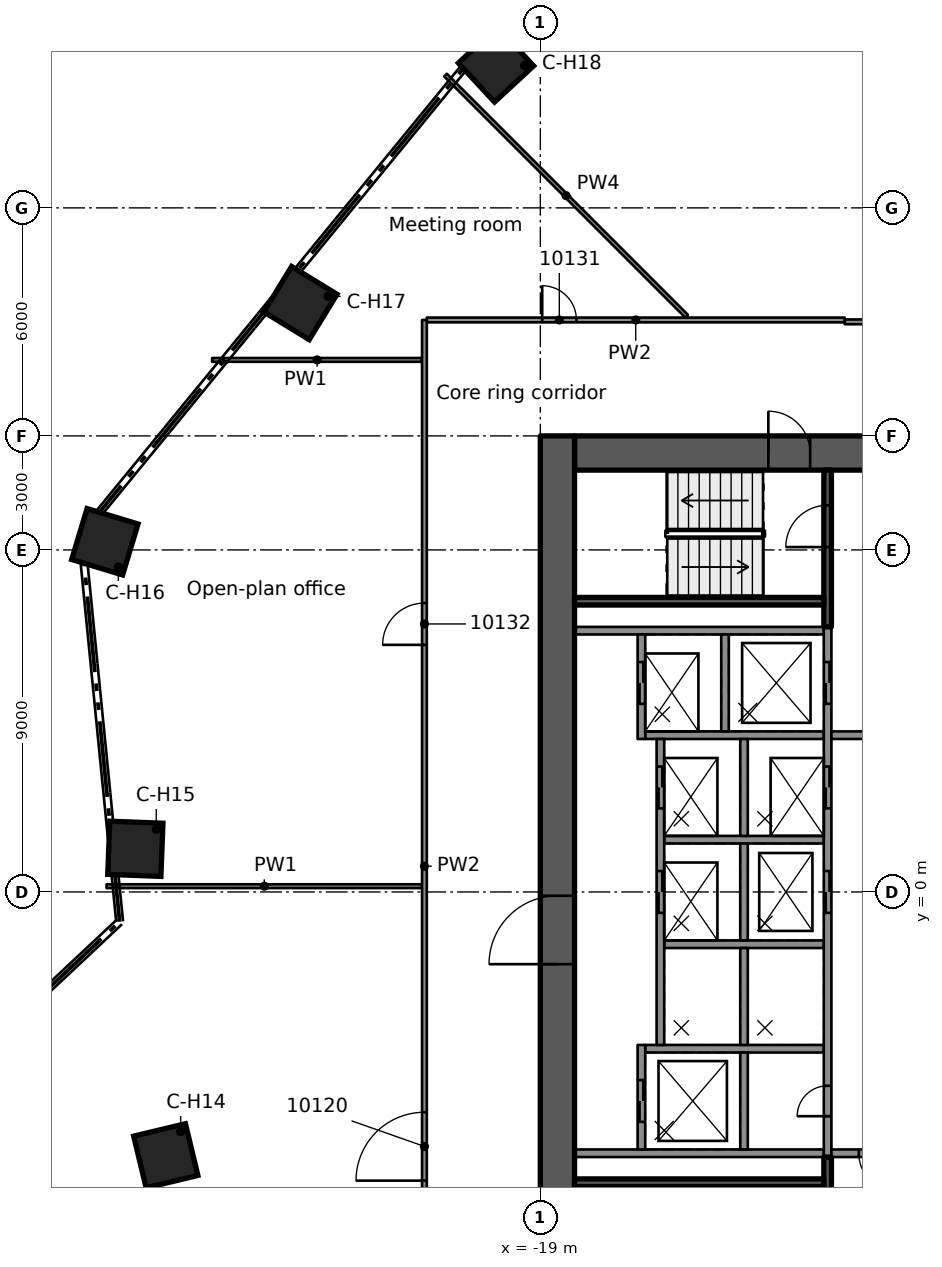
"""IFC4 building model, lengths in metres.
Left out: names, types, materials, properties, quantities, classifications, styles, units other than length and angle.
Written with IfcOpenShell. Run it as: python <this file> out.ifc"""

import sys

from ifc_helpers import new_model, si_unit, direction, frame, frame_2d, origin, origin_2d, place, context, subcontext, project, spatial, rectangle, extrude, element, fill, save


model = new_model("IFC4")
c1 = context("Model", 3, precision=1e-05, world=origin(), true_north=direction((0.0, 1.0)))
c2 = subcontext(c1, "Body", "Model", "MODEL_VIEW")
j1 = project(units=[si_unit("LENGTHUNIT", "METRE"), si_unit("PLANEANGLEUNIT", "RADIAN")], contexts=[c1])
p1 = place(None, origin())
s1 = spatial("IfcSite", under=j1, at=p1, CompositionType="ELEMENT")
p2 = place(p1, origin())
s2 = spatial("IfcBuilding", under=s1, at=p2, CompositionType="ELEMENT")
p3 = place(p2, frame((0.0, 0.0, 51.3)))
s3 = spatial("IfcBuildingStorey", under=s2, at=p3, CompositionType="ELEMENT", Elevation=51.3)
p4 = place(p3, frame((-18.1, 11.55, 0.0), z_axis=(0.0, 0.0, 1.0), x_axis=(1.0, 0.0, 0.0)))
e1 = element("IfcWall", 1, at=p4, inside=s3, PredefinedType="SHEAR", context=c2, shape_type="SweptSolid", body=[
    extrude(rectangle(XDim=9.2, YDim=0.9, at=frame_2d((4.6, 0.0))), origin(), (0.0, 0.0, 1.0), 3.5),
])
p5 = place(p4, frame((5.1, 0.0, 0.0)))
e2 = element("IfcOpeningElement", 2, at=p5, cuts=e1, PredefinedType="OPENING", context=c2, shape_type="SweptSolid", body=[
    extrude(rectangle(XDim=1.1, YDim=2.1, at=frame_2d((0.55, 1.05))), frame((0.0, 0.46, 0.0), z_axis=(0.0, -1.0, 0.0), x_axis=(1.0, 0.0, 0.0)), (0.0, 0.0, 1.0), 0.92),
])
p6 = place(p3, frame((-18.55, -12.0, 0.0), z_axis=(0.0, 0.0, 1.0), x_axis=(0.0, 1.0, 0.0)))
e3 = element("IfcWall", 3, at=p6, inside=s3, PredefinedType="SHEAR", context=c2, shape_type="SweptSolid", body=[
    extrude(rectangle(XDim=24.0, YDim=0.9, at=frame_2d((12.0, 0.0))), origin(), (0.0, 0.0, 1.0), 3.5),
])
p7 = place(p6, frame((10.1, 0.0, 0.0)))
e4 = element("IfcOpeningElement", 4, at=p7, cuts=e3, PredefinedType="OPENING", context=c2, shape_type="SweptSolid", body=[
    extrude(rectangle(XDim=1.8, YDim=2.1, at=frame_2d((0.9, 1.05))), frame((0.0, 0.46, 0.0), z_axis=(0.0, -1.0, 0.0), x_axis=(1.0, 0.0, 0.0)), (0.0, 0.0, 1.0), 0.92),
])
for number, where, z_axis, x_axis in (
    (5, (-28.856, -6.942, 0.0), (0.0, 0.0, 1.0), (-0.972, -0.234, 0.0)),
    (6, (-29.657, 1.136, 0.0), (0.0, 0.0, 1.0), (-0.999, 0.038, 0.0)),
    (7, (-30.459, 9.215, 0.0), (0.0, 0.0, 1.0), (-0.957, 0.29, 0.0)),
    (8, (-25.313, 15.495, 0.0), (0.0, 0.0, 1.0), (-0.853, 0.522, 0.0)),
    (9, (-20.167, 21.774, 0.0), (0.0, 0.0, 1.0), (-0.68, 0.734, 0.0)),
):
    element("IfcColumn", number, at=place(p3, frame(where, z_axis=z_axis, x_axis=x_axis)), inside=s3, PredefinedType="COLUMN", context=c2, shape_type="SweptSolid", body=[
        extrude(rectangle(XDim=1.4, YDim=1.4, at=origin_2d()), origin(), (0.0, 0.0, 1.0), 3.5),
    ])
for number, where, z_axis, x_axis in (
    (10, (-11.54, 6.875, 0.0), (0.0, 0.0, 1.0), (-1.0, 0.0, 0.0)),
    (11, (-11.54, -6.875, 0.0), (0.0, 0.0, 1.0), (-1.0, 0.0, 0.0)),
):
    element("IfcWall", number, at=place(p3, frame(where, z_axis=z_axis, x_axis=x_axis)), inside=s3, PredefinedType="SOLIDWALL", context=c2, shape_type="SweptSolid", body=[
        extrude(rectangle(XDim=6.56, YDim=0.2, at=frame_2d((3.28, 0.0))), origin(), (0.0, 0.0, 1.0), 3.09),
    ])
p8 = place(p3, frame((-11.54, -4.125, 0.0), z_axis=(0.0, 0.0, 1.0), x_axis=(-1.0, 0.0, 0.0)))
e12 = element("IfcWall", 12, at=p8, inside=s3, PredefinedType="SOLIDWALL", context=c2, shape_type="SweptSolid", body=[
    extrude(rectangle(XDim=4.7, YDim=0.2, at=frame_2d((2.35, 0.0))), origin(), (0.0, 0.0, 1.0), 3.09),
])
for number, where, z_axis, x_axis in (
    (13, (-11.54, -1.375, 0.0), (0.0, 0.0, 1.0), (-1.0, 0.0, 0.0)),
    (14, (-11.54, 1.375, 0.0), (0.0, 0.0, 1.0), (-1.0, 0.0, 0.0)),
):
    element("IfcWall", number, at=place(p3, frame(where, z_axis=z_axis, x_axis=x_axis)), inside=s3, PredefinedType="SOLIDWALL", context=c2, shape_type="SweptSolid", body=[
        extrude(rectangle(XDim=4.2, YDim=0.2, at=frame_2d((2.1, 0.0))), origin(), (0.0, 0.0, 1.0), 3.09),
    ])
p9 = place(p3, frame((-11.54, 4.125, 0.0), z_axis=(0.0, 0.0, 1.0), x_axis=(-1.0, 0.0, 0.0)))
e15 = element("IfcWall", 15, at=p9, inside=s3, PredefinedType="SOLIDWALL", context=c2, shape_type="SweptSolid", body=[
    extrude(rectangle(XDim=4.7, YDim=0.2, at=frame_2d((2.35, 0.0))), origin(), (0.0, 0.0, 1.0), 3.09),
])
p10 = place(p3, frame((-11.44, -6.975, 0.0), z_axis=(0.0, 0.0, 1.0), x_axis=(0.0, 1.0, 0.0)))
e16 = element("IfcWall", 16, at=p10, inside=s3, PredefinedType="SOLIDWALL", context=c2, shape_type="SweptSolid", body=[
    extrude(rectangle(XDim=13.95, YDim=0.2, at=frame_2d((6.975, 0.0))), origin(), (0.0, 0.0, 1.0), 3.09),
])
p11 = place(p10, frame((6.425, 0.0, 0.0)))
e17 = element("IfcOpeningElement", 17, at=p11, cuts=e16, PredefinedType="OPENING", context=c2, shape_type="SweptSolid", body=[
    extrude(rectangle(XDim=1.1, YDim=2.1, at=frame_2d((0.55, 1.05))), frame((0.0, 0.11, 0.0), z_axis=(0.0, -1.0, 0.0), x_axis=(1.0, 0.0, 0.0)), (0.0, 0.0, 1.0), 0.22),
])
p12 = place(p10, frame((9.175, 0.0, 0.0)))
e18 = element("IfcOpeningElement", 18, at=p12, cuts=e16, PredefinedType="OPENING", context=c2, shape_type="SweptSolid", body=[
    extrude(rectangle(XDim=1.1, YDim=2.1, at=frame_2d((0.55, 1.05))), frame((0.0, 0.11, 0.0), z_axis=(0.0, -1.0, 0.0), x_axis=(1.0, 0.0, 0.0)), (0.0, 0.0, 1.0), 0.22),
])
p13 = place(p10, frame((11.925, 0.0, 0.0)))
e19 = element("IfcOpeningElement", 19, at=p13, cuts=e16, PredefinedType="OPENING", context=c2, shape_type="SweptSolid", body=[
    extrude(rectangle(XDim=1.1, YDim=2.1, at=frame_2d((0.55, 1.05))), frame((0.0, 0.11, 0.0), z_axis=(0.0, -1.0, 0.0), x_axis=(1.0, 0.0, 0.0)), (0.0, 0.0, 1.0), 0.22),
])
p14 = place(p10, frame((1.075, 0.0, 0.0)))
e20 = element("IfcOpeningElement", 20, at=p14, cuts=e16, PredefinedType="OPENING", context=c2, shape_type="SweptSolid", body=[
    extrude(rectangle(XDim=0.8, YDim=2.1, at=frame_2d((0.4, 1.05))), frame((0.0, 0.11, 0.0), z_axis=(0.0, -1.0, 0.0), x_axis=(1.0, 0.0, 0.0)), (0.0, 0.0, 1.0), 0.22),
])
for number, where, z_axis, x_axis in (
    (21, (-13.64, -6.775, 0.0), (0.0, 0.0, 1.0), (0.0, 1.0, 0.0)),
    (22, (-13.64, -4.025, 0.0), (0.0, 0.0, 1.0), (0.0, 1.0, 0.0)),
    (23, (-13.64, -1.275, 0.0), (0.0, 0.0, 1.0), (0.0, 1.0, 0.0)),
    (24, (-13.64, 1.475, 0.0), (0.0, 0.0, 1.0), (0.0, 1.0, 0.0)),
    (25, (-14.14, 4.225, 0.0), (0.0, 0.0, 1.0), (0.0, 1.0, 0.0)),
):
    element("IfcWall", number, at=place(p3, frame(where, z_axis=z_axis, x_axis=x_axis)), inside=s3, PredefinedType="SOLIDWALL", context=c2, shape_type="SweptSolid", body=[
        extrude(rectangle(XDim=2.55, YDim=0.2, at=frame_2d((1.275, 0.0))), origin(), (0.0, 0.0, 1.0), 3.09),
    ])
p15 = place(p3, frame((-16.34, -6.775, 0.0), z_axis=(0.0, 0.0, 1.0), x_axis=(0.0, 1.0, 0.0)))
e26 = element("IfcWall", 26, at=p15, inside=s3, PredefinedType="SOLIDWALL", context=c2, shape_type="SweptSolid", body=[
    extrude(rectangle(XDim=2.75, YDim=0.2, at=frame_2d((1.375, 0.0))), origin(), (0.0, 0.0, 1.0), 3.09),
])
p16 = place(p15, frame((0.725, 0.0, 0.0)))
e27 = element("IfcOpeningElement", 27, at=p16, cuts=e26, PredefinedType="OPENING", context=c2, shape_type="SweptSolid", body=[
    extrude(rectangle(XDim=1.1, YDim=2.1, at=frame_2d((0.55, 1.05))), frame((0.0, 0.11, 0.0), z_axis=(0.0, -1.0, 0.0), x_axis=(1.0, 0.0, 0.0)), (0.0, 0.0, 1.0), 0.22),
])
p17 = place(p3, frame((-15.84, -4.025, 0.0), z_axis=(0.0, 0.0, 1.0), x_axis=(0.0, 1.0, 0.0)))
e28 = element("IfcWall", 28, at=p17, inside=s3, PredefinedType="SOLIDWALL", context=c2, shape_type="SweptSolid", body=[
    extrude(rectangle(XDim=8.05, YDim=0.2, at=frame_2d((4.025, 0.0))), origin(), (0.0, 0.0, 1.0), 3.09),
])
p18 = place(p17, frame((3.475, 0.0, 0.0)))
e29 = element("IfcOpeningElement", 29, at=p18, cuts=e28, PredefinedType="OPENING", context=c2, shape_type="SweptSolid", body=[
    extrude(rectangle(XDim=1.1, YDim=2.1, at=frame_2d((0.55, 1.05))), frame((0.0, 0.11, 0.0), z_axis=(0.0, -1.0, 0.0), x_axis=(1.0, 0.0, 0.0)), (0.0, 0.0, 1.0), 0.22),
])
p19 = place(p17, frame((6.225, 0.0, 0.0)))
e30 = element("IfcOpeningElement", 30, at=p19, cuts=e28, PredefinedType="OPENING", context=c2, shape_type="SweptSolid", body=[
    extrude(rectangle(XDim=1.1, YDim=2.1, at=frame_2d((0.55, 1.05))), frame((0.0, 0.11, 0.0), z_axis=(0.0, -1.0, 0.0), x_axis=(1.0, 0.0, 0.0)), (0.0, 0.0, 1.0), 0.22),
])
p20 = place(p3, frame((-16.34, 4.025, 0.0), z_axis=(0.0, 0.0, 1.0), x_axis=(0.0, 1.0, 0.0)))
e31 = element("IfcWall", 31, at=p20, inside=s3, PredefinedType="SOLIDWALL", context=c2, shape_type="SweptSolid", body=[
    extrude(rectangle(XDim=2.75, YDim=0.2, at=frame_2d((1.375, 0.0))), origin(), (0.0, 0.0, 1.0), 3.09),
])
p21 = place(p20, frame((0.925, 0.0, 0.0)))
e32 = element("IfcOpeningElement", 32, at=p21, cuts=e31, PredefinedType="OPENING", context=c2, shape_type="SweptSolid", body=[
    extrude(rectangle(XDim=1.1, YDim=2.1, at=frame_2d((0.55, 1.05))), frame((0.0, 0.11, 0.0), z_axis=(0.0, -1.0, 0.0), x_axis=(1.0, 0.0, 0.0)), (0.0, 0.0, 1.0), 0.22),
])
p22 = place(p3, frame((-11.44, 6.975, 0.0), z_axis=(0.0, 0.0, 1.0), x_axis=(0.0, 1.0, 0.0)))
e33 = element("IfcWall", 33, at=p22, inside=s3, PredefinedType="SOLIDWALL", context=c2, shape_type="SweptSolid", body=[
    extrude(rectangle(XDim=4.125, YDim=0.2, at=frame_2d((2.062, 0.0))), origin(), (0.0, 0.0, 1.0), 3.09),
])
p23 = place(p22, frame((2.1, 0.0, 0.0)))
e34 = element("IfcOpeningElement", 34, at=p23, cuts=e33, PredefinedType="OPENING", context=c2, shape_type="SweptSolid", body=[
    extrude(rectangle(XDim=1.1, YDim=2.1, at=frame_2d((0.55, 1.05))), frame((0.0, 0.11, 0.0), z_axis=(0.0, -1.0, 0.0), x_axis=(1.0, 0.0, 0.0)), (0.0, 0.0, 1.0), 0.22),
])
p24 = place(p3, frame((-11.54, 7.65, 0.0), z_axis=(0.0, 0.0, 1.0), x_axis=(-1.0, 0.0, 0.0)))
e35 = element("IfcWall", 35, at=p24, inside=s3, PredefinedType="SOLIDWALL", context=c2, shape_type="SweptSolid", body=[
    extrude(rectangle(XDim=6.56, YDim=0.2, at=frame_2d((3.28, 0.0))), origin(), (0.0, 0.0, 1.0), 3.09),
])
p25 = place(p3, frame((-11.44, -11.1, 0.0), z_axis=(0.0, 0.0, 1.0), x_axis=(0.0, 1.0, 0.0)))
e36 = element("IfcWall", 36, at=p25, inside=s3, PredefinedType="SOLIDWALL", context=c2, shape_type="SweptSolid", body=[
    extrude(rectangle(XDim=4.125, YDim=0.2, at=frame_2d((2.062, 0.0))), origin(), (0.0, 0.0, 1.0), 3.09),
])
p26 = place(p3, frame((-11.54, -7.65, 0.0), z_axis=(0.0, 0.0, 1.0), x_axis=(-1.0, 0.0, 0.0)))
e37 = element("IfcWall", 37, at=p26, inside=s3, PredefinedType="SOLIDWALL", context=c2, shape_type="SweptSolid", body=[
    extrude(rectangle(XDim=6.56, YDim=0.2, at=frame_2d((3.28, 0.0))), origin(), (0.0, 0.0, 1.0), 3.09),
])
p27 = place(p3, frame((-8.9, 4.125, 0.0), z_axis=(0.0, 0.0, 1.0), x_axis=(-1.0, 0.0, 0.0)))
e38 = element("IfcWall", 38, at=p27, inside=s3, PredefinedType="PARTITIONING", context=c2, shape_type="SweptSolid", body=[
    extrude(rectangle(XDim=2.44, YDim=0.2, at=frame_2d((1.22, 0.0))), origin(), (0.0, 0.0, 1.0), 3.09),
])
p28 = place(p3, frame((-8.9, -6.875, 0.0), z_axis=(0.0, 0.0, 1.0), x_axis=(-1.0, 0.0, 0.0)))
e39 = element("IfcWall", 39, at=p28, inside=s3, PredefinedType="PARTITIONING", context=c2, shape_type="SweptSolid", body=[
    extrude(rectangle(XDim=2.44, YDim=0.2, at=frame_2d((1.22, 0.0))), origin(), (0.0, 0.0, 1.0), 3.09),
])
p29 = place(p28, frame((0.72, 0.0, 0.0)))
e40 = element("IfcOpeningElement", 40, at=p29, cuts=e39, PredefinedType="OPENING", context=c2, shape_type="SweptSolid", body=[
    extrude(rectangle(XDim=1.0, YDim=2.1, at=frame_2d((0.5, 1.05))), frame((0.0, 0.11, 0.0), z_axis=(0.0, -1.0, 0.0), x_axis=(1.0, 0.0, 0.0)), (0.0, 0.0, 1.0), 0.22),
])
p30 = place(p3, frame((-36.97, -6.912, 0.0), z_axis=(0.0, 0.0, 1.0), x_axis=(0.684148478852, -0.729342758163, 0.0)))
e41 = element("IfcWall", 41, at=p30, inside=s3, PredefinedType="PARTITIONING", context=c2, shape_type="SweptSolid", body=[
    extrude(rectangle(XDim=14.137, YDim=0.1, at=frame_2d((7.069, 0.0))), origin(), (0.0, 0.0, 1.0), 3.08),
])
p31 = place(p3, frame((-21.495, 21.494, 0.0), z_axis=(0.0, 0.0, 1.0), x_axis=(0.707120384757, -0.707093177355, 0.0)))
e42 = element("IfcWall", 42, at=p31, inside=s3, PredefinedType="PARTITIONING", context=c2, shape_type="SweptSolid", body=[
    extrude(rectangle(XDim=8.973, YDim=0.1, at=frame_2d((4.487, 0.0))), origin(), (0.0, 0.0, 1.0), 2.445),
])
p32 = place(p3, frame((-30.414, 0.152, 0.0), z_axis=(0.0, 0.0, 1.0), x_axis=(1.0, 0.0, 0.0)))
e43 = element("IfcWall", 43, at=p32, inside=s3, PredefinedType="PARTITIONING", context=c2, shape_type="SweptSolid", body=[
    extrude(rectangle(XDim=8.301, YDim=0.1, at=frame_2d((4.15, 0.0))), origin(), (0.0, 0.0, 1.0), 3.08),
])
p33 = place(p3, frame((-27.636, 14.0, 0.0), z_axis=(0.0, 0.0, 1.0), x_axis=(1.0, 0.0, 0.0)))
e44 = element("IfcWall", 44, at=p33, inside=s3, PredefinedType="PARTITIONING", context=c2, shape_type="SweptSolid", body=[
    extrude(rectangle(XDim=5.523, YDim=0.1, at=frame_2d((2.761, 0.0))), origin(), (0.0, 0.0, 1.0), 3.08),
])
p34 = place(p3, frame((-10.99, 15.001, 0.0), z_axis=(0.0, 0.0, 1.0), x_axis=(1.0, 0.0, 0.0)))
e45 = element("IfcWall", 45, at=p34, inside=s3, PredefinedType="PARTITIONING", context=c2, shape_type="SweptSolid", body=[
    extrude(rectangle(XDim=21.98, YDim=0.125, at=frame_2d((10.99, 0.0))), origin(), (0.0, 0.0, 1.0), 3.08),
])
p35 = place(p34, frame((15.59, 0.0, 0.0)))
e46 = element("IfcOpeningElement", 46, at=p35, cuts=e45, PredefinedType="OPENING", context=c2, shape_type="SweptSolid", body=[
    extrude(rectangle(XDim=1.8, YDim=2.1, at=frame_2d((0.9, 1.05))), frame((0.0, 0.073, 0.0), z_axis=(0.0, -1.0, 0.0), x_axis=(1.0, 0.0, 0.0)), (0.0, 0.0, 1.0), 0.145),
])
p36 = place(p34, frame((4.6, 0.0, 0.0)))
e47 = element("IfcOpeningElement", 47, at=p36, cuts=e45, PredefinedType="OPENING", context=c2, shape_type="SweptSolid", body=[
    extrude(rectangle(XDim=1.8, YDim=2.1, at=frame_2d((0.9, 1.05))), frame((0.0, 0.073, 0.0), z_axis=(0.0, -1.0, 0.0), x_axis=(1.0, 0.0, 0.0)), (0.0, 0.0, 1.0), 0.145),
])
p37 = place(p3, frame((-21.988, 15.051, 0.0), z_axis=(0.0, 0.0, 1.0), x_axis=(1.0, 0.0, 0.0)))
e48 = element("IfcWall", 48, at=p37, inside=s3, PredefinedType="PARTITIONING", context=c2, shape_type="SweptSolid", body=[
    extrude(rectangle(XDim=10.997, YDim=0.125, at=frame_2d((5.499, 0.0))), origin(), (0.0, 0.0, 1.0), 3.08),
])
p38 = place(p37, frame((3.038, 0.0, 0.0)))
e49 = element("IfcOpeningElement", 49, at=p38, cuts=e48, PredefinedType="OPENING", context=c2, shape_type="SweptSolid", body=[
    extrude(rectangle(XDim=0.9, YDim=2.1, at=frame_2d((0.45, 1.05))), frame((0.0, 0.073, 0.0), z_axis=(0.0, -1.0, 0.0), x_axis=(1.0, 0.0, 0.0)), (0.0, 0.0, 1.0), 0.145),
])
p39 = place(p3, frame((-22.05, -13.696, 0.0), z_axis=(0.0, 0.0, 1.0), x_axis=(0.0, 1.0, 0.0)))
e50 = element("IfcWall", 50, at=p39, inside=s3, PredefinedType="PARTITIONING", context=c2, shape_type="SweptSolid", body=[
    extrude(rectangle(XDim=28.747, YDim=0.125, at=frame_2d((14.374, 0.0))), origin(), (0.0, 0.0, 1.0), 3.08),
])
p40 = place(p39, frame((6.1, 0.0, 0.0)))
e51 = element("IfcOpeningElement", 51, at=p40, cuts=e50, PredefinedType="OPENING", context=c2, shape_type="SweptSolid", body=[
    extrude(rectangle(XDim=1.8, YDim=2.1, at=frame_2d((0.9, 1.05))), frame((0.0, 0.073, 0.0), z_axis=(0.0, -1.0, 0.0), x_axis=(1.0, 0.0, 0.0)), (0.0, 0.0, 1.0), 0.145),
])
p41 = place(p39, frame((20.198, 0.0, 0.0)))
e52 = element("IfcOpeningElement", 52, at=p41, cuts=e50, PredefinedType="OPENING", context=c2, shape_type="SweptSolid", body=[
    extrude(rectangle(XDim=1.1, YDim=2.1, at=frame_2d((0.55, 1.05))), frame((0.0, 0.073, 0.0), z_axis=(0.0, -1.0, 0.0), x_axis=(1.0, 0.0, 0.0)), (0.0, 0.0, 1.0), 0.145),
])
p42 = place(p16, origin())
e53 = element("IfcDoor", 53, at=p42, inside=s3, OperationType="DOUBLE_DOOR_SLIDING", PredefinedType="DOOR", context=c2, shape_type="SweptSolid", body=[
    extrude(rectangle(XDim=1.1, YDim=2.1, at=frame_2d((0.55, 1.05))), frame((0.0, 0.025, 0.0), z_axis=(0.0, -1.0, 0.0), x_axis=(1.0, 0.0, 0.0)), (0.0, 0.0, 1.0), 0.05),
])
fill(e27, e53)
p43 = place(p11, origin())
e54 = element("IfcDoor", 54, at=p43, inside=s3, OperationType="DOUBLE_DOOR_SLIDING", PredefinedType="DOOR", context=c2, shape_type="SweptSolid", body=[
    extrude(rectangle(XDim=1.1, YDim=2.1, at=frame_2d((0.55, 1.05))), frame((0.0, 0.025, 0.0), z_axis=(0.0, -1.0, 0.0), x_axis=(1.0, 0.0, 0.0)), (0.0, 0.0, 1.0), 0.05),
])
fill(e17, e54)
p44 = place(p18, origin())
e55 = element("IfcDoor", 55, at=p44, inside=s3, OperationType="DOUBLE_DOOR_SLIDING", PredefinedType="DOOR", context=c2, shape_type="SweptSolid", body=[
    extrude(rectangle(XDim=1.1, YDim=2.1, at=frame_2d((0.55, 1.05))), frame((0.0, 0.025, 0.0), z_axis=(0.0, -1.0, 0.0), x_axis=(1.0, 0.0, 0.0)), (0.0, 0.0, 1.0), 0.05),
])
fill(e29, e55)
p45 = place(p12, origin())
e56 = element("IfcDoor", 56, at=p45, inside=s3, OperationType="DOUBLE_DOOR_SLIDING", PredefinedType="DOOR", context=c2, shape_type="SweptSolid", body=[
    extrude(rectangle(XDim=1.1, YDim=2.1, at=frame_2d((0.55, 1.05))), frame((0.0, 0.025, 0.0), z_axis=(0.0, -1.0, 0.0), x_axis=(1.0, 0.0, 0.0)), (0.0, 0.0, 1.0), 0.05),
])
fill(e18, e56)
p46 = place(p19, origin())
e57 = element("IfcDoor", 57, at=p46, inside=s3, OperationType="DOUBLE_DOOR_SLIDING", PredefinedType="DOOR", context=c2, shape_type="SweptSolid", body=[
    extrude(rectangle(XDim=1.1, YDim=2.1, at=frame_2d((0.55, 1.05))), frame((0.0, 0.025, 0.0), z_axis=(0.0, -1.0, 0.0), x_axis=(1.0, 0.0, 0.0)), (0.0, 0.0, 1.0), 0.05),
])
fill(e30, e57)
p47 = place(p13, origin())
e58 = element("IfcDoor", 58, at=p47, inside=s3, OperationType="DOUBLE_DOOR_SLIDING", PredefinedType="DOOR", context=c2, shape_type="SweptSolid", body=[
    extrude(rectangle(XDim=1.1, YDim=2.1, at=frame_2d((0.55, 1.05))), frame((0.0, 0.025, 0.0), z_axis=(0.0, -1.0, 0.0), x_axis=(1.0, 0.0, 0.0)), (0.0, 0.0, 1.0), 0.05),
])
fill(e19, e58)
p48 = place(p21, origin())
e59 = element("IfcDoor", 59, at=p48, inside=s3, OperationType="DOUBLE_DOOR_SLIDING", PredefinedType="DOOR", context=c2, shape_type="SweptSolid", body=[
    extrude(rectangle(XDim=1.1, YDim=2.1, at=frame_2d((0.55, 1.05))), frame((0.0, 0.025, 0.0), z_axis=(0.0, -1.0, 0.0), x_axis=(1.0, 0.0, 0.0)), (0.0, 0.0, 1.0), 0.05),
])
fill(e32, e59)
p49 = place(p14, origin())
e60 = element("IfcDoor", 60, at=p49, inside=s3, OperationType="SINGLE_SWING_LEFT", PredefinedType="DOOR", context=c2, shape_type="SweptSolid", body=[
    extrude(rectangle(XDim=0.8, YDim=2.1, at=frame_2d((0.4, 1.05))), frame((0.0, 0.025, 0.0), z_axis=(0.0, -1.0, 0.0), x_axis=(1.0, 0.0, 0.0)), (0.0, 0.0, 1.0), 0.05),
])
fill(e20, e60)
p50 = place(p7, origin())
e61 = element("IfcDoor", 61, at=p50, inside=s3, OperationType="SINGLE_SWING_LEFT", PredefinedType="DOOR", context=c2, shape_type="SweptSolid", body=[
    extrude(rectangle(XDim=1.8, YDim=2.1, at=frame_2d((0.9, 1.05))), frame((0.0, 0.025, 0.0), z_axis=(0.0, -1.0, 0.0), x_axis=(1.0, 0.0, 0.0)), (0.0, 0.0, 1.0), 0.05),
])
fill(e4, e61)
p51 = place(p5, origin())
e62 = element("IfcDoor", 62, at=p51, inside=s3, OperationType="SINGLE_SWING_RIGHT", PredefinedType="DOOR", context=c2, shape_type="SweptSolid", body=[
    extrude(rectangle(XDim=1.1, YDim=2.1, at=frame_2d((0.55, 1.05))), frame((0.0, 0.025, 0.0), z_axis=(0.0, -1.0, 0.0), x_axis=(1.0, 0.0, 0.0)), (0.0, 0.0, 1.0), 0.05),
])
fill(e2, e62)
p52 = place(p23, origin())
e63 = element("IfcDoor", 63, at=p52, inside=s3, OperationType="SINGLE_SWING_RIGHT", PredefinedType="DOOR", context=c2, shape_type="SweptSolid", body=[
    extrude(rectangle(XDim=1.1, YDim=2.1, at=frame_2d((0.55, 1.05))), frame((0.0, 0.025, 0.0), z_axis=(0.0, -1.0, 0.0), x_axis=(1.0, 0.0, 0.0)), (0.0, 0.0, 1.0), 0.05),
])
fill(e34, e63)
p53 = place(p29, origin())
e64 = element("IfcDoor", 64, at=p53, inside=s3, OperationType="SINGLE_SWING_RIGHT", PredefinedType="DOOR", context=c2, shape_type="SweptSolid", body=[
    extrude(rectangle(XDim=1.0, YDim=2.1, at=frame_2d((0.5, 1.05))), frame((0.0, 0.025, 0.0), z_axis=(0.0, -1.0, 0.0), x_axis=(1.0, 0.0, 0.0)), (0.0, 0.0, 1.0), 0.05),
])
fill(e40, e64)
p54 = place(p40, origin())
e65 = element("IfcDoor", 65, at=p54, inside=s3, OperationType="DOUBLE_DOOR_SINGLE_SWING", PredefinedType="DOOR", context=c2, shape_type="SweptSolid", body=[
    extrude(rectangle(XDim=1.8, YDim=2.1, at=frame_2d((0.9, 1.05))), frame((0.0, 0.025, 0.0), z_axis=(0.0, -1.0, 0.0), x_axis=(1.0, 0.0, 0.0)), (0.0, 0.0, 1.0), 0.05),
])
fill(e51, e65)
p55 = place(p38, origin())
e66 = element("IfcDoor", 66, at=p55, inside=s3, OperationType="SINGLE_SWING_LEFT", PredefinedType="DOOR", context=c2, shape_type="SweptSolid", body=[
    extrude(rectangle(XDim=0.9, YDim=2.1, at=frame_2d((0.45, 1.05))), frame((0.0, 0.025, 0.0), z_axis=(0.0, -1.0, 0.0), x_axis=(1.0, 0.0, 0.0)), (0.0, 0.0, 1.0), 0.05),
])
fill(e49, e66)
p56 = place(p41, origin())
e67 = element("IfcDoor", 67, at=p56, inside=s3, OperationType="SINGLE_SWING_RIGHT", PredefinedType="DOOR", context=c2, shape_type="SweptSolid", body=[
    extrude(rectangle(XDim=1.1, YDim=2.1, at=frame_2d((0.55, 1.05))), frame((0.0, 0.025, 0.0), z_axis=(0.0, -1.0, 0.0), x_axis=(1.0, 0.0, 0.0)), (0.0, 0.0, 1.0), 0.05),
])
fill(e52, e67)
save(model, sys.argv[1])
